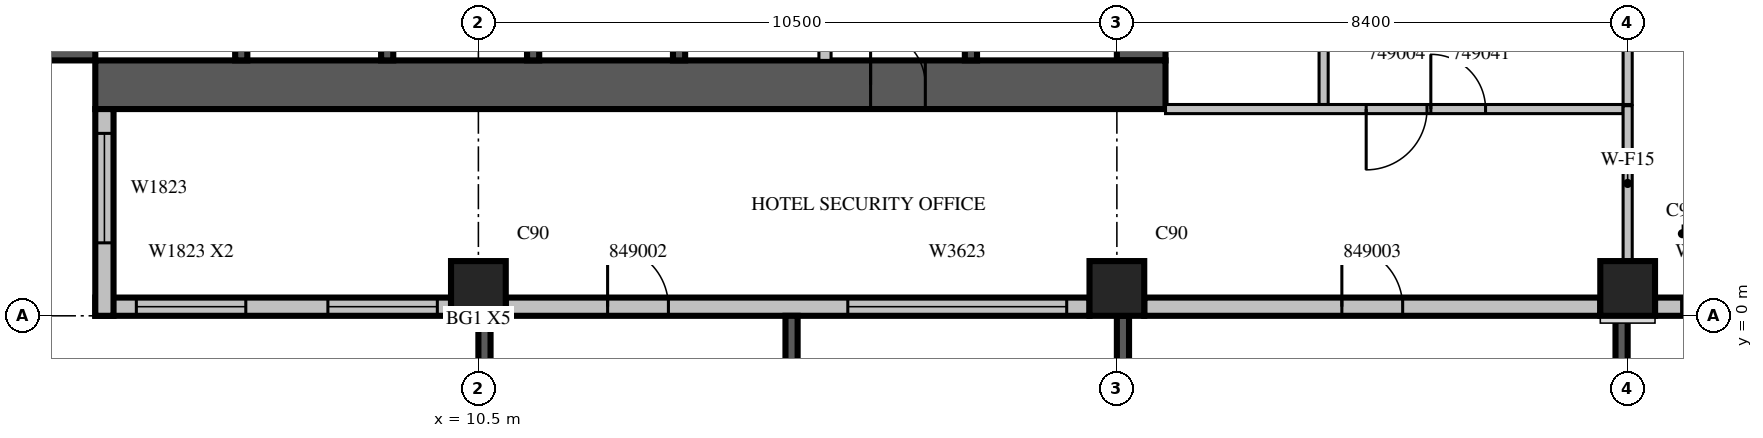
"""IFC4 building model, lengths in metres.
Left out: names, types, materials, properties, quantities, classifications, styles, units other than length and angle.
Written with IfcOpenShell. Run it as: python <this file> out.ifc"""

import sys

from ifc_helpers import new_model, si_unit, direction, frame, frame_2d, origin, origin_2d, place, context, subcontext, project, spatial, rectangle, extrude, source, transform, mapped, element, fill, save


model = new_model("IFC4")
c1 = context("Model", 3, precision=1e-05, world=origin(), true_north=direction((0.0, 1.0)))
c2 = subcontext(c1, "Body", "Model", "MODEL_VIEW")
j1 = project(units=[si_unit("LENGTHUNIT", "METRE"), si_unit("PLANEANGLEUNIT", "RADIAN")], contexts=[c1])
p1 = place(None, origin())
s1 = spatial("IfcSite", under=j1, at=p1, CompositionType="ELEMENT")
p2 = place(p1, origin())
s2 = spatial("IfcBuilding", under=s1, at=p2, CompositionType="ELEMENT")
p3 = place(p2, frame((0.0, 0.0, 219.6)))
s3 = spatial("IfcBuildingStorey", under=s2, at=p3, CompositionType="ELEMENT", Elevation=219.6)
m1 = source(origin(), c2, "Body", "SweptSolid", [
    extrude(rectangle(XDim=0.9, YDim=0.9, at=origin_2d()), origin(), (0.0, 0.0, 1.0), 3.8),
])
for number, where, z_axis, x_axis in (
    (1, (10.5, 0.45, 0.0), (0.0, 0.0, 1.0), (1.0, 0.0, 0.0)),
    (2, (21.0, 0.45, 0.0), (0.0, 0.0, 1.0), (1.0, 0.0, 0.0)),
    (3, (29.4, 0.45, 0.0), (0.0, 0.0, 1.0), (1.0, 0.0, 0.0)),
):
    element("IfcColumn", number, at=place(p3, frame(where, z_axis=z_axis, x_axis=x_axis)), inside=s3, PredefinedType="COLUMN", context=c2, shape_type="MappedRepresentation", body=[
        mapped(m1, transform((0.0, 0.0, 0.0), scale=1.0)),
    ])
m2 = source(origin(), c2, "Body", "SweptSolid", [
    extrude(rectangle(XDim=17.6, YDim=0.8, at=frame_2d((8.8, 0.0))), origin(), (0.0, 0.0, 1.0), 3.8),
])
p4 = place(p3, frame((3.8, 4.2, 0.0), z_axis=(0.0, 0.0, 1.0), x_axis=(0.0, 1.0, 0.0)))
e4 = element("IfcWall", 4, at=p4, inside=s3, PredefinedType="SHEAR", context=c2, shape_type="MappedRepresentation", body=[
    mapped(m2, transform((0.0, 0.0, 0.0), scale=1.0)),
])
m3 = source(origin(), c2, "Body", "SweptSolid", [
    extrude(rectangle(XDim=2.2, YDim=2.1, at=frame_2d((1.1, 1.05))), frame((0.0, 0.41, 0.0), z_axis=(0.0, -1.0, 0.0), x_axis=(1.0, 0.0, 0.0)), (0.0, 0.0, 1.0), 0.82),
])
p5 = place(p4, frame((4.2, 0.0, 0.0)))
e5 = element("IfcOpeningElement", 5, at=p5, cuts=e4, PredefinedType="OPENING", context=c2, shape_type="MappedRepresentation", body=[
    mapped(m3, transform((0.0, 0.0, 0.0), scale=1.0)),
])
m4 = source(origin(), c2, "Body", "SweptSolid", [
    extrude(rectangle(XDim=0.9, YDim=2.1, at=frame_2d((0.45, 1.05))), frame((0.0, 0.41, 0.0), z_axis=(0.0, -1.0, 0.0), x_axis=(1.0, 0.0, 0.0)), (0.0, 0.0, 1.0), 0.82),
])
p6 = place(p4, frame((10.95, 0.0, 0.0)))
e6 = element("IfcOpeningElement", 6, at=p6, cuts=e4, PredefinedType="OPENING", context=c2, shape_type="MappedRepresentation", body=[
    mapped(m4, transform((0.0, 0.0, 0.0), scale=1.0)),
])
m5 = source(origin(), c2, "Body", "SweptSolid", [
    extrude(rectangle(XDim=16.8, YDim=0.8, at=frame_2d((8.4, 0.0))), origin(), (0.0, 0.0, 1.0), 3.8),
])
p7 = place(p3, frame((21.4, 4.2, 0.0), z_axis=(0.0, 0.0, 1.0), x_axis=(0.0, 1.0, 0.0)))
e7 = element("IfcWall", 7, at=p7, inside=s3, PredefinedType="SHEAR", context=c2, shape_type="MappedRepresentation", body=[
    mapped(m5, transform((0.0, 0.0, 0.0), scale=1.0)),
])
p8 = place(p7, frame((4.2, 0.0, 0.0)))
e8 = element("IfcOpeningElement", 8, at=p8, cuts=e7, PredefinedType="OPENING", context=c2, shape_type="MappedRepresentation", body=[
    mapped(m3, transform((0.0, 0.0, 0.0), scale=1.0)),
])
m6 = source(origin(), c2, "Body", "SweptSolid", [
    extrude(rectangle(XDim=1.2, YDim=2.1, at=frame_2d((0.6, 1.05))), frame((0.0, 0.41, 0.0), z_axis=(0.0, -1.0, 0.0), x_axis=(1.0, 0.0, 0.0)), (0.0, 0.0, 1.0), 0.82),
])
p9 = place(p7, frame((14.7, 0.0, 0.0)))
e9 = element("IfcOpeningElement", 9, at=p9, cuts=e7, PredefinedType="OPENING", context=c2, shape_type="MappedRepresentation", body=[
    mapped(m6, transform((0.0, 0.0, 0.0), scale=1.0)),
])
p10 = place(p3, frame((4.2, 3.8, 0.0), z_axis=(0.0, 0.0, 1.0), x_axis=(1.0, 0.0, 0.0)))
e10 = element("IfcWall", 10, at=p10, inside=s3, PredefinedType="SHEAR", context=c2, shape_type="MappedRepresentation", body=[
    mapped(m2, transform((0.0, 0.0, 0.0), scale=1.0)),
])
p11 = place(p10, frame((12.75, 0.0, 0.0)))
e11 = element("IfcOpeningElement", 11, at=p11, cuts=e10, PredefinedType="OPENING", context=c2, shape_type="MappedRepresentation", body=[
    mapped(m4, transform((0.0, 0.0, 0.0), scale=1.0)),
])
m7 = source(origin(), c2, "Body", "SweptSolid", [
    extrude(rectangle(XDim=5.85, YDim=0.3, at=frame_2d((2.925, 0.0))), origin(), (0.0, 0.0, 1.0), 3.4),
])
p12 = place(p3, frame((4.2, 0.15, 0.0), z_axis=(0.0, 0.0, 1.0), x_axis=(1.0, 0.0, 0.0)))
e12 = element("IfcWall", 12, at=p12, inside=s3, PredefinedType="STANDARD", context=c2, shape_type="MappedRepresentation", body=[
    mapped(m7, transform((0.0, 0.0, 0.0), scale=1.0)),
])
m8 = source(origin(), c2, "Body", "SweptSolid", [
    extrude(rectangle(XDim=1.8, YDim=2.3, at=frame_2d((0.9, 1.15))), frame((0.0, 0.16, 0.0), z_axis=(0.0, -1.0, 0.0), x_axis=(1.0, 0.0, 0.0)), (0.0, 0.0, 1.0), 0.32),
])
p13 = place(p12, frame((0.675, 0.0, 0.6)))
e13 = element("IfcOpeningElement", 13, at=p13, cuts=e12, PredefinedType="OPENING", context=c2, shape_type="MappedRepresentation", body=[
    mapped(m8, transform((0.0, 0.0, 0.0), scale=1.0)),
])
p14 = place(p12, frame((3.825, 0.0, 0.6)))
e14 = element("IfcOpeningElement", 14, at=p14, cuts=e12, PredefinedType="OPENING", context=c2, shape_type="MappedRepresentation", body=[
    mapped(m8, transform((0.0, 0.0, 0.0), scale=1.0)),
])
m9 = source(origin(), c2, "Body", "SweptSolid", [
    extrude(rectangle(XDim=9.6, YDim=0.3, at=frame_2d((4.8, 0.0))), origin(), (0.0, 0.0, 1.0), 3.4),
])
p15 = place(p3, frame((10.95, 0.15, 0.0), z_axis=(0.0, 0.0, 1.0), x_axis=(1.0, 0.0, 0.0)))
e15 = element("IfcWall", 15, at=p15, inside=s3, PredefinedType="STANDARD", context=c2, shape_type="MappedRepresentation", body=[
    mapped(m9, transform((0.0, 0.0, 0.0), scale=1.0)),
])
m10 = source(origin(), c2, "Body", "SweptSolid", [
    extrude(rectangle(XDim=3.6, YDim=2.3, at=frame_2d((1.8, 1.15))), frame((0.0, 0.16, 0.0), z_axis=(0.0, -1.0, 0.0), x_axis=(1.0, 0.0, 0.0)), (0.0, 0.0, 1.0), 0.32),
])
p16 = place(p15, frame((5.625, 0.0, 0.6)))
e16 = element("IfcOpeningElement", 16, at=p16, cuts=e15, PredefinedType="OPENING", context=c2, shape_type="MappedRepresentation", body=[
    mapped(m10, transform((0.0, 0.0, 0.0), scale=1.0)),
])
m11 = source(origin(), c2, "Body", "SweptSolid", [
    extrude(rectangle(XDim=1.0, YDim=2.1, at=frame_2d((0.5, 1.05))), frame((0.0, 0.16, 0.0), z_axis=(0.0, -1.0, 0.0), x_axis=(1.0, 0.0, 0.0)), (0.0, 0.0, 1.0), 0.32),
])
p17 = place(p15, frame((1.675, 0.0, 0.0)))
e17 = element("IfcOpeningElement", 17, at=p17, cuts=e15, PredefinedType="OPENING", context=c2, shape_type="MappedRepresentation", body=[
    mapped(m11, transform((0.0, 0.0, 0.0), scale=1.0)),
])
m12 = source(origin(), c2, "Body", "SweptSolid", [
    extrude(rectangle(XDim=7.5, YDim=0.3, at=frame_2d((3.75, 0.0))), origin(), (0.0, 0.0, 1.0), 3.4),
])
p18 = place(p3, frame((21.45, 0.15, 0.0), z_axis=(0.0, 0.0, 1.0), x_axis=(1.0, 0.0, 0.0)))
e18 = element("IfcWall", 18, at=p18, inside=s3, PredefinedType="STANDARD", context=c2, shape_type="MappedRepresentation", body=[
    mapped(m12, transform((0.0, 0.0, 0.0), scale=1.0)),
])
p19 = place(p18, frame((3.25, 0.0, 0.0)))
e19 = element("IfcOpeningElement", 19, at=p19, cuts=e18, PredefinedType="OPENING", context=c2, shape_type="MappedRepresentation", body=[
    mapped(m11, transform((0.0, 0.0, 0.0), scale=1.0)),
])
p20 = place(p3, frame((29.85, 0.15, 0.0), z_axis=(0.0, 0.0, 1.0), x_axis=(1.0, 0.0, 0.0)))
e20 = element("IfcWall", 20, at=p20, inside=s3, PredefinedType="STANDARD", context=c2, shape_type="MappedRepresentation", body=[
    mapped(m12, transform((0.0, 0.0, 0.0), scale=1.0)),
])
m13 = source(origin(), c2, "Body", "SweptSolid", [
    extrude(rectangle(XDim=1.2, YDim=2.3, at=frame_2d((0.6, 1.15))), frame((0.0, 0.16, 0.0), z_axis=(0.0, -1.0, 0.0), x_axis=(1.0, 0.0, 0.0)), (0.0, 0.0, 1.0), 0.32),
])
p21 = place(p20, frame((0.438, 0.0, 0.6)))
e21 = element("IfcOpeningElement", 21, at=p21, cuts=e20, PredefinedType="OPENING", context=c2, shape_type="MappedRepresentation", body=[
    mapped(m13, transform((0.0, 0.0, 0.0), scale=1.0)),
])
p22 = place(p20, frame((5.963, 0.0, 0.6)))
e22 = element("IfcOpeningElement", 22, at=p22, cuts=e20, PredefinedType="OPENING", context=c2, shape_type="MappedRepresentation", body=[
    mapped(m13, transform((0.0, 0.0, 0.0), scale=1.0)),
])
m14 = source(origin(), c2, "Body", "SweptSolid", [
    extrude(rectangle(XDim=3.4, YDim=0.3, at=frame_2d((1.7, 0.0))), origin(), (0.0, 0.0, 1.0), 3.4),
])
p23 = place(p3, frame((4.35, 3.4, 0.0), z_axis=(0.0, 0.0, 1.0), x_axis=(0.0, -1.0, 0.0)))
e23 = element("IfcWall", 23, at=p23, inside=s3, PredefinedType="STANDARD", context=c2, shape_type="MappedRepresentation", body=[
    mapped(m14, transform((0.0, 0.0, 0.0), scale=1.0)),
])
p24 = place(p23, frame((0.4, 0.0, 0.6)))
e24 = element("IfcOpeningElement", 24, at=p24, cuts=e23, PredefinedType="OPENING", context=c2, shape_type="MappedRepresentation", body=[
    mapped(m8, transform((0.0, 0.0, 0.0), scale=1.0)),
])
m15 = source(origin(), c2, "Body", "SweptSolid", [
    extrude(rectangle(XDim=3.9, YDim=0.2, at=frame_2d((1.95, 0.0))), origin(), (0.0, 0.0, 1.0), 3.39),
])
p25 = place(p3, frame((10.6, 0.0, 0.0), z_axis=(0.0, 0.0, 1.0), x_axis=(0.0, -1.0, 0.0)))
e25 = element("IfcWall", 25, at=p25, inside=s3, PredefinedType="SOLIDWALL", context=c2, shape_type="MappedRepresentation", body=[
    mapped(m15, transform((0.0, 0.0, 0.0), scale=1.0)),
])
m16 = source(origin(), c2, "Body", "SweptSolid", [
    extrude(rectangle(XDim=2.4, YDim=2.3, at=frame_2d((1.2, 1.15))), frame((0.0, 0.11, 0.0), z_axis=(0.0, -1.0, 0.0), x_axis=(1.0, 0.0, 0.0)), (0.0, 0.0, 1.0), 0.22),
])
p26 = place(p25, frame((0.75, 0.0, 0.6)))
e26 = element("IfcOpeningElement", 26, at=p26, cuts=e25, PredefinedType="OPENING", context=c2, shape_type="MappedRepresentation", body=[
    mapped(m16, transform((0.0, 0.0, 0.0), scale=1.0)),
])
p27 = place(p3, frame((15.65, 0.0, 0.0), z_axis=(0.0, 0.0, 1.0), x_axis=(0.0, -1.0, 0.0)))
e27 = element("IfcWall", 27, at=p27, inside=s3, PredefinedType="SOLIDWALL", context=c2, shape_type="MappedRepresentation", body=[
    mapped(m15, transform((0.0, 0.0, 0.0), scale=1.0)),
])
p28 = place(p27, frame((0.75, 0.0, 0.6)))
e28 = element("IfcOpeningElement", 28, at=p28, cuts=e27, PredefinedType="OPENING", context=c2, shape_type="MappedRepresentation", body=[
    mapped(m16, transform((0.0, 0.0, 0.0), scale=1.0)),
])
p29 = place(p3, frame((21.1, 0.0, 0.0), z_axis=(0.0, 0.0, 1.0), x_axis=(0.0, -1.0, 0.0)))
e29 = element("IfcWall", 29, at=p29, inside=s3, PredefinedType="SOLIDWALL", context=c2, shape_type="MappedRepresentation", body=[
    mapped(m15, transform((0.0, 0.0, 0.0), scale=1.0)),
])
p30 = place(p29, frame((0.75, 0.0, 0.6)))
e30 = element("IfcOpeningElement", 30, at=p30, cuts=e29, PredefinedType="OPENING", context=c2, shape_type="MappedRepresentation", body=[
    mapped(m16, transform((0.0, 0.0, 0.0), scale=1.0)),
])
p31 = place(p3, frame((29.3, 0.0, 0.0), z_axis=(0.0, 0.0, 1.0), x_axis=(0.0, -1.0, 0.0)))
e31 = element("IfcWall", 31, at=p31, inside=s3, PredefinedType="SOLIDWALL", context=c2, shape_type="MappedRepresentation", body=[
    mapped(m15, transform((0.0, 0.0, 0.0), scale=1.0)),
])
p32 = place(p31, frame((0.75, 0.0, 0.6)))
e32 = element("IfcOpeningElement", 32, at=p32, cuts=e31, PredefinedType="OPENING", context=c2, shape_type="MappedRepresentation", body=[
    mapped(m16, transform((0.0, 0.0, 0.0), scale=1.0)),
])
m17 = source(origin(), c2, "Body", "SweptSolid", [
    extrude(rectangle(XDim=3.1, YDim=0.2, at=frame_2d((1.55, 0.0))), origin(), (0.0, 0.0, 1.0), 3.8),
])
for number, where, z_axis, x_axis in (
    (33, (6.6, 4.2, 0.0), (0.0, 0.0, 1.0), (0.0, 1.0, 0.0)),
    (34, (9.0, 4.2, 0.0), (0.0, 0.0, 1.0), (0.0, 1.0, 0.0)),
    (35, (11.4, 4.2, 0.0), (0.0, 0.0, 1.0), (0.0, 1.0, 0.0)),
):
    element("IfcWall", number, at=place(p3, frame(where, z_axis=z_axis, x_axis=x_axis)), inside=s3, PredefinedType="SOLIDWALL", context=c2, shape_type="MappedRepresentation", body=[
        mapped(m17, transform((0.0, 0.0, 0.0), scale=1.0)),
    ])
m18 = source(origin(), c2, "Body", "SweptSolid", [
    extrude(rectangle(XDim=3.1, YDim=0.2, at=frame_2d((1.55, 0.0))), origin(), (0.0, 0.0, 1.0), 3.4),
])
for number, where, z_axis, x_axis in (
    (36, (13.8, 4.2, 0.0), (0.0, 0.0, 1.0), (0.0, 1.0, 0.0)),
    (37, (18.6, 4.2, 0.0), (0.0, 0.0, 1.0), (0.0, 1.0, 0.0)),
):
    element("IfcWall", number, at=place(p3, frame(where, z_axis=z_axis, x_axis=x_axis)), inside=s3, PredefinedType="SOLIDWALL", context=c2, shape_type="MappedRepresentation", body=[
        mapped(m18, transform((0.0, 0.0, 0.0), scale=1.0)),
    ])
m19 = source(origin(), c2, "Body", "SweptSolid", [
    extrude(rectangle(XDim=3.1, YDim=0.2, at=frame_2d((1.55, 0.0))), origin(), (0.0, 0.0, 1.0), 3.4),
])
p33 = place(p3, frame((16.2, 4.2, 0.0), z_axis=(0.0, 0.0, 1.0), x_axis=(0.0, 1.0, 0.0)))
e38 = element("IfcWall", 38, at=p33, inside=s3, PredefinedType="PARTITIONING", context=c2, shape_type="MappedRepresentation", body=[
    mapped(m19, transform((0.0, 0.0, 0.0), scale=1.0)),
])
m20 = source(origin(), c2, "Body", "SweptSolid", [
    extrude(rectangle(XDim=11.225, YDim=0.15, at=frame_2d((5.612, 0.0))), origin(), (0.0, 0.0, 1.0), 3.4),
])
p34 = place(p3, frame((24.4, 14.7, 0.0), z_axis=(0.0, 0.0, 1.0), x_axis=(0.0, -1.0, 0.0)))
e39 = element("IfcWall", 39, at=p34, inside=s3, PredefinedType="PARTITIONING", context=c2, shape_type="MappedRepresentation", body=[
    mapped(m20, transform((0.0, 0.0, 0.0), scale=1.0)),
])
m21 = source(origin(), c2, "Body", "SweptSolid", [
    extrude(rectangle(XDim=0.9, YDim=2.1, at=frame_2d((0.45, 1.05))), frame((0.0, 0.085, 0.0), z_axis=(0.0, -1.0, 0.0), x_axis=(1.0, 0.0, 0.0)), (0.0, 0.0, 1.0), 0.17),
])
p35 = place(p34, frame((9.062, 0.0, 0.0)))
e40 = element("IfcOpeningElement", 40, at=p35, cuts=e39, PredefinedType="OPENING", context=c2, shape_type="MappedRepresentation", body=[
    mapped(m21, transform((0.0, 0.0, 0.0), scale=1.0)),
])
p36 = place(p34, frame((2.575, 0.0, 0.0)))
e41 = element("IfcOpeningElement", 41, at=p36, cuts=e39, PredefinedType="OPENING", context=c2, shape_type="MappedRepresentation", body=[
    mapped(m21, transform((0.0, 0.0, 0.0), scale=1.0)),
])
m22 = source(origin(), c2, "Body", "SweptSolid", [
    extrude(rectangle(XDim=6.576, YDim=0.15, at=frame_2d((3.288, 0.0))), origin(), (0.0, 0.0, 1.0), 3.4),
])
p37 = place(p3, frame((29.4, 3.475, 0.0), z_axis=(0.0, 0.0, 1.0), x_axis=(0.0, 1.0, 0.0)))
e42 = element("IfcWall", 42, at=p37, inside=s3, PredefinedType="PARTITIONING", context=c2, shape_type="MappedRepresentation", body=[
    mapped(m22, transform((0.0, 0.0, 0.0), scale=1.0)),
])
m23 = source(origin(), c2, "Body", "SweptSolid", [
    extrude(rectangle(XDim=7.525, YDim=0.15, at=frame_2d((3.763, 0.0))), origin(), (0.0, 0.0, 1.0), 3.4),
])
p38 = place(p3, frame((21.8, 3.4, 0.0), z_axis=(0.0, 0.0, 1.0), x_axis=(1.0, 0.0, 0.0)))
e43 = element("IfcWall", 43, at=p38, inside=s3, PredefinedType="PARTITIONING", context=c2, shape_type="MappedRepresentation", body=[
    mapped(m23, transform((0.0, 0.0, 0.0), scale=1.0)),
])
m24 = source(origin(), c2, "Body", "SweptSolid", [
    extrude(rectangle(XDim=1.0, YDim=2.1, at=frame_2d((0.5, 1.05))), frame((0.0, 0.085, 0.0), z_axis=(0.0, -1.0, 0.0), x_axis=(1.0, 0.0, 0.0)), (0.0, 0.0, 1.0), 0.17),
])
p39 = place(p38, frame((3.3, 0.0, 0.0)))
e44 = element("IfcOpeningElement", 44, at=p39, cuts=e43, PredefinedType="OPENING", context=c2, shape_type="MappedRepresentation", body=[
    mapped(m24, transform((0.0, 0.0, 0.0), scale=1.0)),
])
p40 = place(p38, frame((4.363, 0.0, 0.0)))
e45 = element("IfcOpeningElement", 45, at=p40, cuts=e43, PredefinedType="OPENING", context=c2, shape_type="MappedRepresentation", body=[
    mapped(m21, transform((0.0, 0.0, 0.0), scale=1.0)),
])
m25 = source(origin(), c2, "Body", "SweptSolid", [
    extrude(rectangle(XDim=2.556, YDim=0.15, at=frame_2d((1.278, 0.0))), origin(), (0.0, 0.0, 1.0), 3.4),
])
p41 = place(p3, frame((29.4, 0.899, 0.0), z_axis=(0.0, 0.0, 1.0), x_axis=(0.0, 1.0, 0.0)))
e46 = element("IfcWall", 46, at=p41, inside=s3, PredefinedType="PARTITIONING", context=c2, shape_type="MappedRepresentation", body=[
    mapped(m25, transform((0.0, 0.0, 0.0), scale=1.0)),
])
m26 = source(origin(), c2, "Body", "SweptSolid", [
    extrude(rectangle(XDim=1.8, YDim=2.3, at=frame_2d((0.9, 1.15))), frame((0.0, 0.03, 0.0), z_axis=(0.0, -1.0, 0.0), x_axis=(1.0, 0.0, 0.0)), (0.0, 0.0, 1.0), 0.06),
])
p42 = place(p13, origin())
e47 = element("IfcWindow", 47, at=p42, inside=s3, PartitioningType="SINGLE_PANEL", PredefinedType="WINDOW", context=c2, shape_type="MappedRepresentation", body=[
    mapped(m26, transform((0.0, 0.0, 0.0), scale=1.0)),
])
fill(e13, e47)
p43 = place(p14, origin())
e48 = element("IfcWindow", 48, at=p43, inside=s3, PartitioningType="SINGLE_PANEL", PredefinedType="WINDOW", context=c2, shape_type="MappedRepresentation", body=[
    mapped(m26, transform((0.0, 0.0, 0.0), scale=1.0)),
])
fill(e14, e48)
m27 = source(origin(), c2, "Body", "SweptSolid", [
    extrude(rectangle(XDim=3.6, YDim=2.3, at=frame_2d((1.8, 1.15))), frame((0.0, 0.03, 0.0), z_axis=(0.0, -1.0, 0.0), x_axis=(1.0, 0.0, 0.0)), (0.0, 0.0, 1.0), 0.06),
])
p44 = place(p16, origin())
e49 = element("IfcWindow", 49, at=p44, inside=s3, PartitioningType="SINGLE_PANEL", PredefinedType="WINDOW", context=c2, shape_type="MappedRepresentation", body=[
    mapped(m27, transform((0.0, 0.0, 0.0), scale=1.0)),
])
fill(e16, e49)
m28 = source(origin(), c2, "Body", "SweptSolid", [
    extrude(rectangle(XDim=1.2, YDim=2.3, at=frame_2d((0.6, 1.15))), frame((0.0, 0.03, 0.0), z_axis=(0.0, -1.0, 0.0), x_axis=(1.0, 0.0, 0.0)), (0.0, 0.0, 1.0), 0.06),
])
p45 = place(p21, origin())
e50 = element("IfcWindow", 50, at=p45, inside=s3, PartitioningType="SINGLE_PANEL", PredefinedType="WINDOW", context=c2, shape_type="MappedRepresentation", body=[
    mapped(m28, transform((0.0, 0.0, 0.0), scale=1.0)),
])
fill(e21, e50)
p46 = place(p24, origin())
e51 = element("IfcWindow", 51, at=p46, inside=s3, PartitioningType="SINGLE_PANEL", PredefinedType="WINDOW", context=c2, shape_type="MappedRepresentation", body=[
    mapped(m26, transform((0.0, 0.0, 0.0), scale=1.0)),
])
fill(e24, e51)
m29 = source(origin(), c2, "Body", "SweptSolid", [
    extrude(rectangle(XDim=0.9, YDim=2.1, at=frame_2d((0.45, 1.05))), frame((0.0, 0.025, 0.0), z_axis=(0.0, -1.0, 0.0), x_axis=(1.0, 0.0, 0.0)), (0.0, 0.0, 1.0), 0.05),
])
p47 = place(p11, origin())
e52 = element("IfcDoor", 52, at=p47, inside=s3, OperationType="SINGLE_SWING_LEFT", PredefinedType="DOOR", context=c2, shape_type="MappedRepresentation", body=[
    mapped(m29, transform((0.0, 0.0, 0.0), scale=1.0)),
])
fill(e11, e52)
m30 = source(origin(), c2, "Body", "SweptSolid", [
    extrude(rectangle(XDim=1.0, YDim=2.1, at=frame_2d((0.5, 1.05))), frame((0.0, 0.025, 0.0), z_axis=(0.0, -1.0, 0.0), x_axis=(1.0, 0.0, 0.0)), (0.0, 0.0, 1.0), 0.05),
])
p48 = place(p39, origin())
e53 = element("IfcDoor", 53, at=p48, inside=s3, OperationType="SINGLE_SWING_RIGHT", PredefinedType="DOOR", context=c2, shape_type="MappedRepresentation", body=[
    mapped(m30, transform((0.0, 0.0, 0.0), scale=1.0)),
])
fill(e44, e53)
p49 = place(p40, origin())
e54 = element("IfcDoor", 54, at=p49, inside=s3, OperationType="SINGLE_SWING_LEFT", PredefinedType="DOOR", context=c2, shape_type="MappedRepresentation", body=[
    mapped(m29, transform((0.0, 0.0, 0.0), scale=1.0)),
])
fill(e45, e54)
p50 = place(p17, origin())
e55 = element("IfcDoor", 55, at=p50, inside=s3, OperationType="SINGLE_SWING_LEFT", PredefinedType="DOOR", context=c2, shape_type="MappedRepresentation", body=[
    mapped(m30, transform((0.0, 0.0, 0.0), scale=1.0)),
])
fill(e17, e55)
p51 = place(p19, origin())
e56 = element("IfcDoor", 56, at=p51, inside=s3, OperationType="SINGLE_SWING_LEFT", PredefinedType="DOOR", context=c2, shape_type="MappedRepresentation", body=[
    mapped(m30, transform((0.0, 0.0, 0.0), scale=1.0)),
])
fill(e19, e56)
save(model, sys.argv[1])
